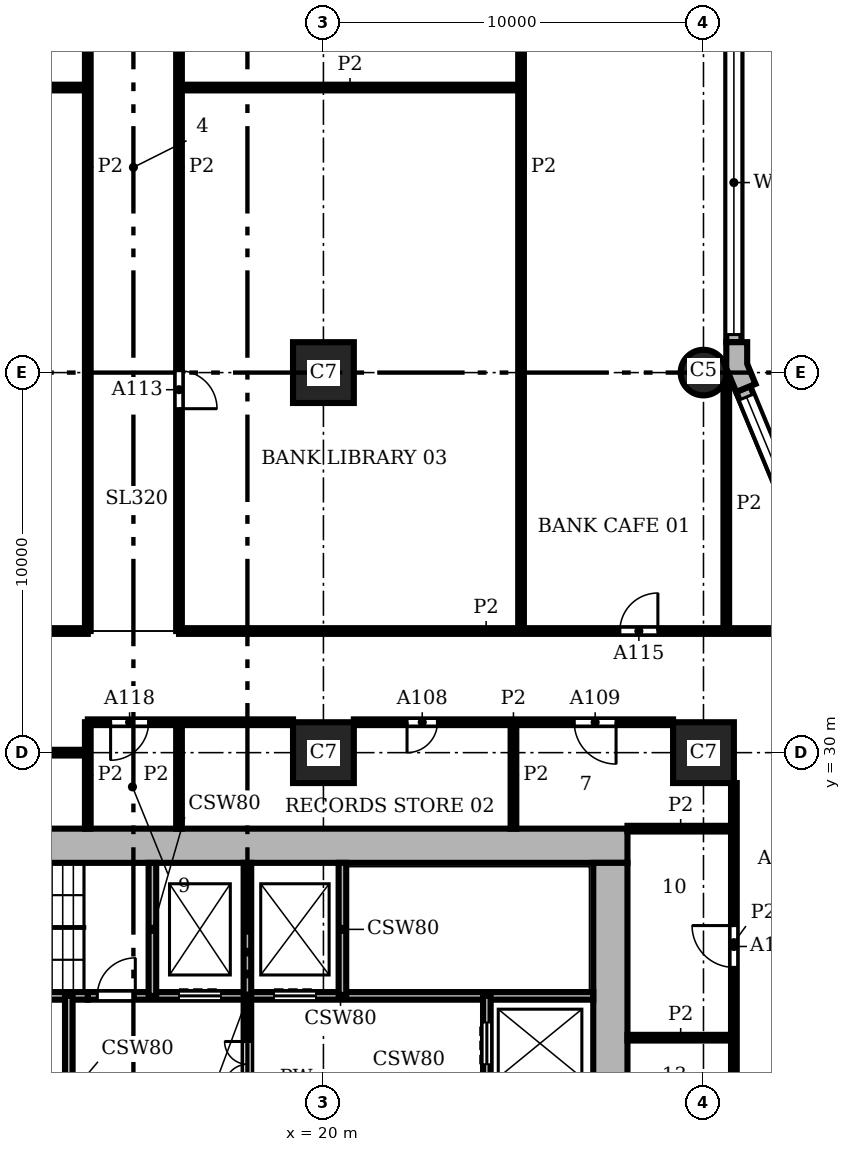
"""IFC4 building model, lengths in metres.
Left out: names, types, materials, properties, quantities, classifications, styles, units other than length and angle.
Written with IfcOpenShell. Run it as: python <this file> out.ifc"""

import sys

from ifc_helpers import new_model, si_unit, direction, frame, frame_2d, origin, origin_2d, place, context, subcontext, project, spatial, polyline, rectangle, circle, outline, extrude, element, fill, save


model = new_model("IFC4")
c1 = context("Model", 3, precision=1e-05, world=origin(), true_north=direction((0.0, 1.0)))
c2 = subcontext(c1, "Body", "Model", "MODEL_VIEW")
j1 = project(units=[si_unit("LENGTHUNIT", "METRE"), si_unit("PLANEANGLEUNIT", "RADIAN")], contexts=[c1])
p1 = place(None, origin())
s1 = spatial("IfcSite", under=j1, at=p1, CompositionType="ELEMENT")
p2 = place(p1, origin())
s2 = spatial("IfcBuilding", under=s1, at=p2, CompositionType="ELEMENT")
p3 = place(p2, frame((0.0, 0.0, 12.0)))
s3 = spatial("IfcBuildingStorey", under=s2, at=p3, CompositionType="ELEMENT", Elevation=12.0)
p4 = place(p3, frame((30.0, 40.0, 0.0), z_axis=(0.0, 0.0, 1.0), x_axis=(1.0, 0.0, 0.0)))
e1 = element("IfcColumn", 1, at=p4, inside=s3, PredefinedType="COLUMN", context=c2, shape_type="SweptSolid", body=[
    extrude(circle(Radius=0.6, at=origin_2d()), origin(), (0.0, 0.0, 1.0), 3.9),
])
for number, where, z_axis, x_axis in (
    (2, (20.0, 30.0, 0.0), (0.0, 0.0, 1.0), (1.0, 0.0, 0.0)),
    (3, (20.0, 40.0, 0.0), (0.0, 0.0, 1.0), (1.0, 0.0, 0.0)),
    (4, (30.0, 30.0, 0.0), (0.0, 0.0, 1.0), (1.0, 0.0, 0.0)),
):
    element("IfcColumn", number, at=place(p3, frame(where, z_axis=z_axis, x_axis=x_axis)), inside=s3, PredefinedType="COLUMN", context=c2, shape_type="SweptSolid", body=[
        extrude(rectangle(XDim=1.6, YDim=1.6, at=origin_2d()), origin(), (0.0, 0.0, 1.0), 3.9),
    ])
p5 = place(p3, frame((27.55, 8.9, 0.0), z_axis=(0.0, 0.0, 1.0), x_axis=(0.0, 1.0, 0.0)))
e5 = element("IfcWall", 5, at=p5, inside=s3, PredefinedType="SHEAR", context=c2, shape_type="SweptSolid", body=[
    extrude(rectangle(XDim=18.2, YDim=0.9, at=frame_2d((9.1, 0.0))), origin(), (0.0, 0.0, 1.0), 3.9),
])
p6 = place(p5, frame((4.55, 0.0, 0.0)))
e6 = element("IfcOpeningElement", 6, at=p6, cuts=e5, PredefinedType="OPENING", context=c2, shape_type="SweptSolid", body=[
    extrude(rectangle(XDim=1.6, YDim=2.1, at=frame_2d((0.8, 1.05))), frame((0.0, 0.46, 0.0), z_axis=(0.0, -1.0, 0.0), x_axis=(1.0, 0.0, 0.0)), (0.0, 0.0, 1.0), 0.92),
])
p7 = place(p3, frame((28.0, 27.55, 0.0), z_axis=(0.0, 0.0, 1.0), x_axis=(-1.0, 0.0, 0.0)))
e7 = element("IfcWall", 7, at=p7, inside=s3, PredefinedType="SHEAR", context=c2, shape_type="SweptSolid", body=[
    extrude(rectangle(XDim=20.0, YDim=0.9, at=frame_2d((10.0, 0.0))), origin(), (0.0, 0.0, 1.0), 3.9),
])
p8 = place(p3, origin())
e8 = element("IfcWall", 8, at=p8, inside=s3, PredefinedType="SOLIDWALL", context=c2, shape_type="SweptSolid", body=[
    extrude(outline(polyline([(31.23, 39.644), (31.369, 39.701), (31.15, 40.229), (31.15, 40.8), (31.0, 40.8), (30.6, 40.8), (30.6, 40.119), (30.861, 39.49), (31.23, 39.644)])), origin(), (0.0, 0.0, 1.0), 3.9),
])
p9 = place(p3, frame((33.362, 33.974, 0.0), z_axis=(0.0, 0.0, 1.0), x_axis=(-0.382655745237, 0.923891000409, 0.0)))
e9 = element("IfcWall", 9, at=p9, inside=s3, PredefinedType="SOLIDWALL", context=c2, shape_type="SweptSolid", body=[
    extrude(rectangle(XDim=6.053, YDim=0.4, at=frame_2d((3.027, 0.0))), origin(), (0.0, 0.0, 1.0), 3.9),
])
p10 = place(p9, frame((0.227, 0.0, 0.9)))
e10 = element("IfcOpeningElement", 10, at=p10, cuts=e9, PredefinedType="OPENING", context=c2, shape_type="SweptSolid", body=[
    extrude(rectangle(XDim=5.6, YDim=2.35, at=frame_2d((2.8, 1.175))), frame((0.0, 0.21, 0.0), z_axis=(0.0, -1.0, 0.0), x_axis=(1.0, 0.0, 0.0)), (0.0, 0.0, 1.0), 0.42),
])
p11 = place(p3, frame((30.8, 40.8, 0.0), z_axis=(0.0, 0.0, 1.0), x_axis=(0.0, 1.0, 0.0)))
e11 = element("IfcWall", 11, at=p11, inside=s3, PredefinedType="SOLIDWALL", context=c2, shape_type="SweptSolid", body=[
    extrude(rectangle(XDim=18.4, YDim=0.4, at=frame_2d((9.2, 0.0))), origin(), (0.0, 0.0, 1.0), 3.9),
])
p12 = place(p11, frame((0.2, 0.0, 0.9)))
e12 = element("IfcOpeningElement", 12, at=p12, cuts=e11, PredefinedType="OPENING", context=c2, shape_type="SweptSolid", body=[
    extrude(rectangle(XDim=8.0, YDim=2.35, at=frame_2d((4.0, 1.175))), frame((0.0, 0.21, 0.0), z_axis=(0.0, -1.0, 0.0), x_axis=(1.0, 0.0, 0.0)), (0.0, 0.0, 1.0), 0.42),
])
p13 = place(p11, frame((10.2, 0.0, 0.9)))
e13 = element("IfcOpeningElement", 13, at=p13, cuts=e11, PredefinedType="OPENING", context=c2, shape_type="SweptSolid", body=[
    extrude(rectangle(XDim=8.0, YDim=2.35, at=frame_2d((4.0, 1.175))), frame((0.0, 0.21, 0.0), z_axis=(0.0, -1.0, 0.0), x_axis=(1.0, 0.0, 0.0)), (0.0, 0.0, 1.0), 0.42),
])
p14 = place(p3, frame((8.9, 23.6, 0.0), z_axis=(0.0, 0.0, 1.0), x_axis=(1.0, 0.0, 0.0)))
e14 = element("IfcWall", 14, at=p14, inside=s3, PredefinedType="SHEAR", context=c2, shape_type="SweptSolid", body=[
    extrude(rectangle(XDim=4.9, YDim=0.2, at=frame_2d((2.45, 0.0))), origin(), (0.0, 0.0, 1.0), 3.58),
])
p15 = place(p3, frame((13.8, 23.6, 0.0), z_axis=(0.0, 0.0, 1.0), x_axis=(1.0, 0.0, 0.0)))
e15 = element("IfcWall", 15, at=p15, inside=s3, PredefinedType="SHEAR", context=c2, shape_type="SweptSolid", body=[
    extrude(rectangle(XDim=13.3, YDim=0.2, at=frame_2d((6.65, 0.0))), origin(), (0.0, 0.0, 1.0), 3.58),
])
p16 = place(p15, frame((2.4, 0.0, 0.0)))
e16 = element("IfcOpeningElement", 16, at=p16, cuts=e15, PredefinedType="OPENING", context=c2, shape_type="SweptSolid", body=[
    extrude(rectangle(XDim=1.1, YDim=2.1, at=frame_2d((0.55, 1.05))), frame((0.0, 0.11, 0.0), z_axis=(0.0, -1.0, 0.0), x_axis=(1.0, 0.0, 0.0)), (0.0, 0.0, 1.0), 0.22),
])
p17 = place(p15, frame((4.9, 0.0, 0.0)))
e17 = element("IfcOpeningElement", 17, at=p17, cuts=e15, PredefinedType="OPENING", context=c2, shape_type="SweptSolid", body=[
    extrude(rectangle(XDim=1.1, YDim=2.1, at=frame_2d((0.55, 1.05))), frame((0.0, 0.11, 0.0), z_axis=(0.0, -1.0, 0.0), x_axis=(1.0, 0.0, 0.0)), (0.0, 0.0, 1.0), 0.22),
])
p18 = place(p15, frame((0.25, 0.0, 0.0)))
e18 = element("IfcOpeningElement", 18, at=p18, cuts=e15, PredefinedType="OPENING", context=c2, shape_type="SweptSolid", body=[
    extrude(rectangle(XDim=1.0, YDim=2.1, at=frame_2d((0.5, 1.05))), frame((0.0, 0.11, 0.0), z_axis=(0.0, -1.0, 0.0), x_axis=(1.0, 0.0, 0.0)), (0.0, 0.0, 1.0), 0.22),
])
p19 = place(p3, frame((13.3, 20.0, 0.0), z_axis=(0.0, 0.0, 1.0), x_axis=(0.0, 1.0, 0.0)))
e19 = element("IfcWall", 19, at=p19, inside=s3, PredefinedType="SHEAR", context=c2, shape_type="SweptSolid", body=[
    extrude(rectangle(XDim=3.6, YDim=0.2, at=frame_2d((1.8, 0.0))), origin(), (0.0, 0.0, 1.0), 3.58),
])
p20 = place(p3, frame((15.5, 23.6, 0.0), z_axis=(0.0, 0.0, 1.0), x_axis=(0.0, 1.0, 0.0)))
e20 = element("IfcWall", 20, at=p20, inside=s3, PredefinedType="SHEAR", context=c2, shape_type="SweptSolid", body=[
    extrude(rectangle(XDim=3.5, YDim=0.2, at=frame_2d((1.75, 0.0))), origin(), (0.0, 0.0, 1.0), 3.58),
])
p21 = place(p3, frame((18.0, 20.0, 0.0), z_axis=(0.0, 0.0, 1.0), x_axis=(0.0, 1.0, 0.0)))
e21 = element("IfcWall", 21, at=p21, inside=s3, PredefinedType="SHEAR", context=c2, shape_type="SweptSolid", body=[
    extrude(rectangle(XDim=7.1, YDim=0.2, at=frame_2d((3.55, 0.0))), origin(), (0.0, 0.0, 1.0), 3.58),
])
p22 = place(p21, frame((1.2, 0.0, 0.0)))
e22 = element("IfcOpeningElement", 22, at=p22, cuts=e21, PredefinedType="OPENING", context=c2, shape_type="SweptSolid", body=[
    extrude(rectangle(XDim=1.2, YDim=2.1, at=frame_2d((0.6, 1.05))), frame((0.0, 0.11, 0.0), z_axis=(0.0, -1.0, 0.0), x_axis=(1.0, 0.0, 0.0)), (0.0, 0.0, 1.0), 0.22),
])
p23 = place(p3, frame((20.5, 23.6, 0.0), z_axis=(0.0, 0.0, 1.0), x_axis=(0.0, 1.0, 0.0)))
e23 = element("IfcWall", 23, at=p23, inside=s3, PredefinedType="SHEAR", context=c2, shape_type="SweptSolid", body=[
    extrude(rectangle(XDim=3.5, YDim=0.2, at=frame_2d((1.75, 0.0))), origin(), (0.0, 0.0, 1.0), 3.58),
])
p24 = place(p3, frame((24.3, 16.1, 0.0), z_axis=(0.0, 0.0, 1.0), x_axis=(0.0, 1.0, 0.0)))
e24 = element("IfcWall", 24, at=p24, inside=s3, PredefinedType="SHEAR", context=c2, shape_type="SweptSolid", body=[
    extrude(rectangle(XDim=7.5, YDim=0.2, at=frame_2d((3.75, 0.0))), origin(), (0.0, 0.0, 1.0), 3.58),
])
p25 = place(p24, frame((5.7, 0.0, 0.0)))
e25 = element("IfcOpeningElement", 25, at=p25, cuts=e24, PredefinedType="OPENING", context=c2, shape_type="SweptSolid", body=[
    extrude(rectangle(XDim=1.1, YDim=2.1, at=frame_2d((0.55, 1.05))), frame((0.0, 0.11, 0.0), z_axis=(0.0, -1.0, 0.0), x_axis=(1.0, 0.0, 0.0)), (0.0, 0.0, 1.0), 0.22),
])
p26 = place(p3, frame((13.8, 28.0, 0.0), z_axis=(0.0, 0.0, 1.0), x_axis=(0.0, 1.0, 0.0)))
e26 = element("IfcWall", 26, at=p26, inside=s3, PredefinedType="PARTITIONING", context=c2, shape_type="SweptSolid", body=[
    extrude(rectangle(XDim=2.8, YDim=0.15, at=frame_2d((1.4, 0.0))), origin(), (0.0, 0.0, 1.0), 3.58),
])
p27 = place(p3, frame((13.8, 33.2, 0.0), z_axis=(0.0, 0.0, 1.0), x_axis=(0.0, 1.0, 0.0)))
e27 = element("IfcWall", 27, at=p27, inside=s3, PredefinedType="PARTITIONING", context=c2, shape_type="SweptSolid", body=[
    extrude(rectangle(XDim=24.4, YDim=0.15, at=frame_2d((12.2, 0.0))), origin(), (0.0, 0.0, 1.0), 3.58),
])
p28 = place(p3, frame((16.2, 28.0, 0.0), z_axis=(0.0, 0.0, 1.0), x_axis=(0.0, 1.0, 0.0)))
e28 = element("IfcWall", 28, at=p28, inside=s3, PredefinedType="PARTITIONING", context=c2, shape_type="SweptSolid", body=[
    extrude(rectangle(XDim=2.8, YDim=0.15, at=frame_2d((1.4, 0.0))), origin(), (0.0, 0.0, 1.0), 3.58),
])
p29 = place(p3, frame((16.2, 33.2, 0.0), z_axis=(0.0, 0.0, 1.0), x_axis=(0.0, 1.0, 0.0)))
e29 = element("IfcWall", 29, at=p29, inside=s3, PredefinedType="PARTITIONING", context=c2, shape_type="SweptSolid", body=[
    extrude(rectangle(XDim=24.4, YDim=0.15, at=frame_2d((12.2, 0.0))), origin(), (0.0, 0.0, 1.0), 3.58),
])
p30 = place(p29, frame((5.85, 0.0, 0.0)))
e30 = element("IfcOpeningElement", 30, at=p30, cuts=e29, PredefinedType="OPENING", context=c2, shape_type="SweptSolid", body=[
    extrude(rectangle(XDim=1.0, YDim=2.1, at=frame_2d((0.5, 1.05))), frame((0.0, 0.085, 0.0), z_axis=(0.0, -1.0, 0.0), x_axis=(1.0, 0.0, 0.0)), (0.0, 0.0, 1.0), 0.17),
])
p31 = place(p29, frame((18.15, 0.0, 0.0)))
e31 = element("IfcOpeningElement", 31, at=p31, cuts=e29, PredefinedType="OPENING", context=c2, shape_type="SweptSolid", body=[
    extrude(rectangle(XDim=1.0, YDim=2.1, at=frame_2d((0.5, 1.05))), frame((0.0, 0.085, 0.0), z_axis=(0.0, -1.0, 0.0), x_axis=(1.0, 0.0, 0.0)), (0.0, 0.0, 1.0), 0.17),
])
p32 = place(p3, frame((25.0, 28.0, 0.0), z_axis=(0.0, 0.0, 1.0), x_axis=(0.0, 1.0, 0.0)))
e32 = element("IfcWall", 32, at=p32, inside=s3, PredefinedType="PARTITIONING", context=c2, shape_type="SweptSolid", body=[
    extrude(rectangle(XDim=2.8, YDim=0.15, at=frame_2d((1.4, 0.0))), origin(), (0.0, 0.0, 1.0), 3.58),
])
p33 = place(p3, frame((25.2, 33.2, 0.0), z_axis=(0.0, 0.0, 1.0), x_axis=(0.0, 1.0, 0.0)))
e33 = element("IfcWall", 33, at=p33, inside=s3, PredefinedType="PARTITIONING", context=c2, shape_type="SweptSolid", body=[
    extrude(rectangle(XDim=24.4, YDim=0.15, at=frame_2d((12.2, 0.0))), origin(), (0.0, 0.0, 1.0), 3.58),
])
p34 = place(p3, frame((30.6, 33.2, 0.0), z_axis=(0.0, 0.0, 1.0), x_axis=(0.0, 1.0, 0.0)))
e34 = element("IfcWall", 34, at=p34, inside=s3, PredefinedType="PARTITIONING", context=c2, shape_type="SweptSolid", body=[
    extrude(rectangle(XDim=6.699, YDim=0.15, at=frame_2d((3.35, 0.0))), origin(), (0.0, 0.0, 1.0), 3.58),
])
p35 = place(p3, frame((30.8, 20.8, 0.0), z_axis=(0.0, 0.0, 1.0), x_axis=(0.0, 1.0, 0.0)))
e35 = element("IfcWall", 35, at=p35, inside=s3, PredefinedType="PARTITIONING", context=c2, shape_type="SweptSolid", body=[
    extrude(rectangle(XDim=8.4, YDim=0.15, at=frame_2d((4.2, 0.0))), origin(), (0.0, 0.0, 1.0), 3.58),
])
p36 = place(p35, frame((3.55, 0.0, 0.0)))
e36 = element("IfcOpeningElement", 36, at=p36, cuts=e35, PredefinedType="OPENING", context=c2, shape_type="SweptSolid", body=[
    extrude(rectangle(XDim=1.1, YDim=2.1, at=frame_2d((0.55, 1.05))), frame((0.0, 0.085, 0.0), z_axis=(0.0, -1.0, 0.0), x_axis=(1.0, 0.0, 0.0)), (0.0, 0.0, 1.0), 0.17),
])
for number, where, z_axis, x_axis in (
    (37, (28.0, 22.5, 0.0), (0.0, 0.0, 1.0), (1.0, 0.0, 0.0)),
    (38, (28.0, 28.0, 0.0), (0.0, 0.0, 1.0), (1.0, 0.0, 0.0)),
):
    element("IfcWall", number, at=place(p3, frame(where, z_axis=z_axis, x_axis=x_axis)), inside=s3, PredefinedType="PARTITIONING", context=c2, shape_type="SweptSolid", body=[
        extrude(rectangle(XDim=2.8, YDim=0.15, at=frame_2d((1.4, 0.0))), origin(), (0.0, 0.0, 1.0), 3.58),
    ])
p37 = place(p3, frame((10.8, 30.0, 0.0), z_axis=(0.0, 0.0, 1.0), x_axis=(1.0, 0.0, 0.0)))
e39 = element("IfcWall", 39, at=p37, inside=s3, PredefinedType="PARTITIONING", context=c2, shape_type="SweptSolid", body=[
    extrude(rectangle(XDim=3.0, YDim=0.15, at=frame_2d((1.5, 0.0))), origin(), (0.0, 0.0, 1.0), 3.58),
])
p38 = place(p37, frame((0.9, 0.0, 0.0)))
e40 = element("IfcOpeningElement", 40, at=p38, cuts=e39, PredefinedType="OPENING", context=c2, shape_type="SweptSolid", body=[
    extrude(rectangle(XDim=0.8, YDim=2.1, at=frame_2d((0.4, 1.05))), frame((0.0, 0.085, 0.0), z_axis=(0.0, -1.0, 0.0), x_axis=(1.0, 0.0, 0.0)), (0.0, 0.0, 1.0), 0.17),
])
p39 = place(p3, frame((13.8, 30.8, 0.0), z_axis=(0.0, 0.0, 1.0), x_axis=(1.0, 0.0, 0.0)))
e41 = element("IfcWall", 41, at=p39, inside=s3, PredefinedType="PARTITIONING", context=c2, shape_type="SweptSolid", body=[
    extrude(rectangle(XDim=5.4, YDim=0.15, at=frame_2d((2.7, 0.0))), origin(), (0.0, 0.0, 1.0), 3.58),
])
p40 = place(p39, frame((0.6, 0.0, 0.0)))
e42 = element("IfcOpeningElement", 42, at=p40, cuts=e41, PredefinedType="OPENING", context=c2, shape_type="SweptSolid", body=[
    extrude(rectangle(XDim=1.0, YDim=2.1, at=frame_2d((0.5, 1.05))), frame((0.0, 0.085, 0.0), z_axis=(0.0, -1.0, 0.0), x_axis=(1.0, 0.0, 0.0)), (0.0, 0.0, 1.0), 0.17),
])
p41 = place(p3, frame((20.8, 30.8, 0.0), z_axis=(0.0, 0.0, 1.0), x_axis=(1.0, 0.0, 0.0)))
e43 = element("IfcWall", 43, at=p41, inside=s3, PredefinedType="PARTITIONING", context=c2, shape_type="SweptSolid", body=[
    extrude(rectangle(XDim=8.4, YDim=0.15, at=frame_2d((4.2, 0.0))), origin(), (0.0, 0.0, 1.0), 3.58),
])
p42 = place(p41, frame((1.4, 0.0, 0.0)))
e44 = element("IfcOpeningElement", 44, at=p42, cuts=e43, PredefinedType="OPENING", context=c2, shape_type="SweptSolid", body=[
    extrude(rectangle(XDim=0.8, YDim=2.1, at=frame_2d((0.4, 1.05))), frame((0.0, 0.085, 0.0), z_axis=(0.0, -1.0, 0.0), x_axis=(1.0, 0.0, 0.0)), (0.0, 0.0, 1.0), 0.17),
])
p43 = place(p41, frame((5.8, 0.0, 0.0)))
e45 = element("IfcOpeningElement", 45, at=p43, cuts=e43, PredefinedType="OPENING", context=c2, shape_type="SweptSolid", body=[
    extrude(rectangle(XDim=1.1, YDim=2.1, at=frame_2d((0.55, 1.05))), frame((0.0, 0.085, 0.0), z_axis=(0.0, -1.0, 0.0), x_axis=(1.0, 0.0, 0.0)), (0.0, 0.0, 1.0), 0.17),
])
p44 = place(p3, frame((8.0, 33.2, 0.0), z_axis=(0.0, 0.0, 1.0), x_axis=(1.0, 0.0, 0.0)))
e46 = element("IfcWall", 46, at=p44, inside=s3, PredefinedType="PARTITIONING", context=c2, shape_type="SweptSolid", body=[
    extrude(rectangle(XDim=5.8, YDim=0.15, at=frame_2d((2.9, 0.0))), origin(), (0.0, 0.0, 1.0), 3.58),
])
p45 = place(p3, frame((16.2, 33.2, 0.0), z_axis=(0.0, 0.0, 1.0), x_axis=(1.0, 0.0, 0.0)))
e47 = element("IfcWall", 47, at=p45, inside=s3, PredefinedType="PARTITIONING", context=c2, shape_type="SweptSolid", body=[
    extrude(rectangle(XDim=16.162, YDim=0.15, at=frame_2d((8.081, 0.0))), origin(), (0.0, 0.0, 1.0), 3.58),
])
p46 = place(p45, frame((11.6, 0.0, 0.0)))
e48 = element("IfcOpeningElement", 48, at=p46, cuts=e47, PredefinedType="OPENING", context=c2, shape_type="SweptSolid", body=[
    extrude(rectangle(XDim=1.0, YDim=2.1, at=frame_2d((0.5, 1.05))), frame((0.0, 0.085, 0.0), z_axis=(0.0, -1.0, 0.0), x_axis=(1.0, 0.0, 0.0)), (0.0, 0.0, 1.0), 0.17),
])
p47 = place(p3, frame((8.0, 47.5, 0.0), z_axis=(0.0, 0.0, 1.0), x_axis=(1.0, 0.0, 0.0)))
e49 = element("IfcWall", 49, at=p47, inside=s3, PredefinedType="PARTITIONING", context=c2, shape_type="SweptSolid", body=[
    extrude(rectangle(XDim=5.8, YDim=0.15, at=frame_2d((2.9, 0.0))), origin(), (0.0, 0.0, 1.0), 3.58),
])
p48 = place(p3, frame((16.2, 47.5, 0.0), z_axis=(0.0, 0.0, 1.0), x_axis=(1.0, 0.0, 0.0)))
e50 = element("IfcWall", 50, at=p48, inside=s3, PredefinedType="PARTITIONING", context=c2, shape_type="SweptSolid", body=[
    extrude(rectangle(XDim=9.0, YDim=0.15, at=frame_2d((4.5, 0.0))), origin(), (0.0, 0.0, 1.0), 3.58),
])
p49 = place(p10, origin())
e51 = element("IfcWindow", 51, at=p49, inside=s3, PartitioningType="SINGLE_PANEL", PredefinedType="WINDOW", context=c2, shape_type="SweptSolid", body=[
    extrude(rectangle(XDim=5.6, YDim=2.35, at=frame_2d((2.8, 1.175))), frame((0.0, 0.16, 0.0), z_axis=(0.0, -1.0, 0.0), x_axis=(1.0, 0.0, 0.0)), (0.0, 0.0, 1.0), 0.06),
])
fill(e10, e51)
p50 = place(p12, origin())
e52 = element("IfcWindow", 52, at=p50, inside=s3, PartitioningType="SINGLE_PANEL", PredefinedType="WINDOW", context=c2, shape_type="SweptSolid", body=[
    extrude(rectangle(XDim=8.0, YDim=2.35, at=frame_2d((4.0, 1.175))), frame((0.0, 0.16, 0.0), z_axis=(0.0, -1.0, 0.0), x_axis=(1.0, 0.0, 0.0)), (0.0, 0.0, 1.0), 0.06),
])
fill(e12, e52)
p51 = place(p25, origin())
e53 = element("IfcDoor", 53, at=p51, inside=s3, OperationType="DOUBLE_DOOR_SLIDING", PredefinedType="DOOR", context=c2, shape_type="SweptSolid", body=[
    extrude(rectangle(XDim=1.1, YDim=2.1, at=frame_2d((0.55, 1.05))), frame((0.0, 0.025, 0.0), z_axis=(0.0, -1.0, 0.0), x_axis=(1.0, 0.0, 0.0)), (0.0, 0.0, 1.0), 0.05),
])
fill(e25, e53)
p52 = place(p16, origin())
e54 = element("IfcDoor", 54, at=p52, inside=s3, OperationType="DOUBLE_DOOR_SLIDING", PredefinedType="DOOR", context=c2, shape_type="SweptSolid", body=[
    extrude(rectangle(XDim=1.1, YDim=2.1, at=frame_2d((0.55, 1.05))), frame((0.0, 0.025, 0.0), z_axis=(0.0, -1.0, 0.0), x_axis=(1.0, 0.0, 0.0)), (0.0, 0.0, 1.0), 0.05),
])
fill(e16, e54)
p53 = place(p17, origin())
e55 = element("IfcDoor", 55, at=p53, inside=s3, OperationType="DOUBLE_DOOR_SLIDING", PredefinedType="DOOR", context=c2, shape_type="SweptSolid", body=[
    extrude(rectangle(XDim=1.1, YDim=2.1, at=frame_2d((0.55, 1.05))), frame((0.0, 0.025, 0.0), z_axis=(0.0, -1.0, 0.0), x_axis=(1.0, 0.0, 0.0)), (0.0, 0.0, 1.0), 0.05),
])
fill(e17, e55)
p54 = place(p18, origin())
e56 = element("IfcDoor", 56, at=p54, inside=s3, OperationType="SINGLE_SWING_RIGHT", PredefinedType="DOOR", context=c2, shape_type="SweptSolid", body=[
    extrude(rectangle(XDim=1.0, YDim=2.1, at=frame_2d((0.5, 1.05))), frame((0.0, 0.025, 0.0), z_axis=(0.0, -1.0, 0.0), x_axis=(1.0, 0.0, 0.0)), (0.0, 0.0, 1.0), 0.05),
])
fill(e18, e56)
p55 = place(p22, origin())
e57 = element("IfcDoor", 57, at=p55, inside=s3, OperationType="DOUBLE_DOOR_SINGLE_SWING", PredefinedType="DOOR", context=c2, shape_type="SweptSolid", body=[
    extrude(rectangle(XDim=1.2, YDim=2.1, at=frame_2d((0.6, 1.05))), frame((0.0, 0.025, 0.0), z_axis=(0.0, -1.0, 0.0), x_axis=(1.0, 0.0, 0.0)), (0.0, 0.0, 1.0), 0.05),
])
fill(e22, e57)
p56 = place(p36, origin())
e58 = element("IfcDoor", 58, at=p56, inside=s3, OperationType="SINGLE_SWING_RIGHT", PredefinedType="DOOR", context=c2, shape_type="SweptSolid", body=[
    extrude(rectangle(XDim=1.1, YDim=2.1, at=frame_2d((0.55, 1.05))), frame((0.0, 0.025, 0.0), z_axis=(0.0, -1.0, 0.0), x_axis=(1.0, 0.0, 0.0)), (0.0, 0.0, 1.0), 0.05),
])
fill(e36, e58)
p57 = place(p42, frame((0.8, 0.0, 0.0), z_axis=(0.0, 0.0, 1.0), x_axis=(-1.0, 0.0, 0.0)))
e59 = element("IfcDoor", 59, at=p57, inside=s3, OperationType="SINGLE_SWING_RIGHT", PredefinedType="DOOR", context=c2, shape_type="SweptSolid", body=[
    extrude(rectangle(XDim=0.8, YDim=2.1, at=frame_2d((0.4, 1.05))), frame((0.0, 0.025, 0.0), z_axis=(0.0, -1.0, 0.0), x_axis=(1.0, 0.0, 0.0)), (0.0, 0.0, 1.0), 0.05),
])
fill(e44, e59)
p58 = place(p43, frame((1.1, 0.0, 0.0), z_axis=(0.0, 0.0, 1.0), x_axis=(-1.0, 0.0, 0.0)))
e60 = element("IfcDoor", 60, at=p58, inside=s3, OperationType="SINGLE_SWING_LEFT", PredefinedType="DOOR", context=c2, shape_type="SweptSolid", body=[
    extrude(rectangle(XDim=1.1, YDim=2.1, at=frame_2d((0.55, 1.05))), frame((0.0, 0.025, 0.0), z_axis=(0.0, -1.0, 0.0), x_axis=(1.0, 0.0, 0.0)), (0.0, 0.0, 1.0), 0.05),
])
fill(e45, e60)
p59 = place(p30, frame((1.0, 0.0, 0.0), z_axis=(0.0, 0.0, 1.0), x_axis=(-1.0, 0.0, 0.0)))
e61 = element("IfcDoor", 61, at=p59, inside=s3, OperationType="SINGLE_SWING_RIGHT", PredefinedType="DOOR", context=c2, shape_type="SweptSolid", body=[
    extrude(rectangle(XDim=1.0, YDim=2.1, at=frame_2d((0.5, 1.05))), frame((0.0, 0.025, 0.0), z_axis=(0.0, -1.0, 0.0), x_axis=(1.0, 0.0, 0.0)), (0.0, 0.0, 1.0), 0.05),
])
fill(e30, e61)
p60 = place(p46, origin())
e62 = element("IfcDoor", 62, at=p60, inside=s3, OperationType="SINGLE_SWING_RIGHT", PredefinedType="DOOR", context=c2, shape_type="SweptSolid", body=[
    extrude(rectangle(XDim=1.0, YDim=2.1, at=frame_2d((0.5, 1.05))), frame((0.0, 0.025, 0.0), z_axis=(0.0, -1.0, 0.0), x_axis=(1.0, 0.0, 0.0)), (0.0, 0.0, 1.0), 0.05),
])
fill(e48, e62)
p61 = place(p40, frame((1.0, 0.0, 0.0), z_axis=(0.0, 0.0, 1.0), x_axis=(-1.0, 0.0, 0.0)))
e63 = element("IfcDoor", 63, at=p61, inside=s3, OperationType="SINGLE_SWING_RIGHT", PredefinedType="DOOR", context=c2, shape_type="SweptSolid", body=[
    extrude(rectangle(XDim=1.0, YDim=2.1, at=frame_2d((0.5, 1.05))), frame((0.0, 0.025, 0.0), z_axis=(0.0, -1.0, 0.0), x_axis=(1.0, 0.0, 0.0)), (0.0, 0.0, 1.0), 0.05),
])
fill(e42, e63)
save(model, sys.argv[1])
